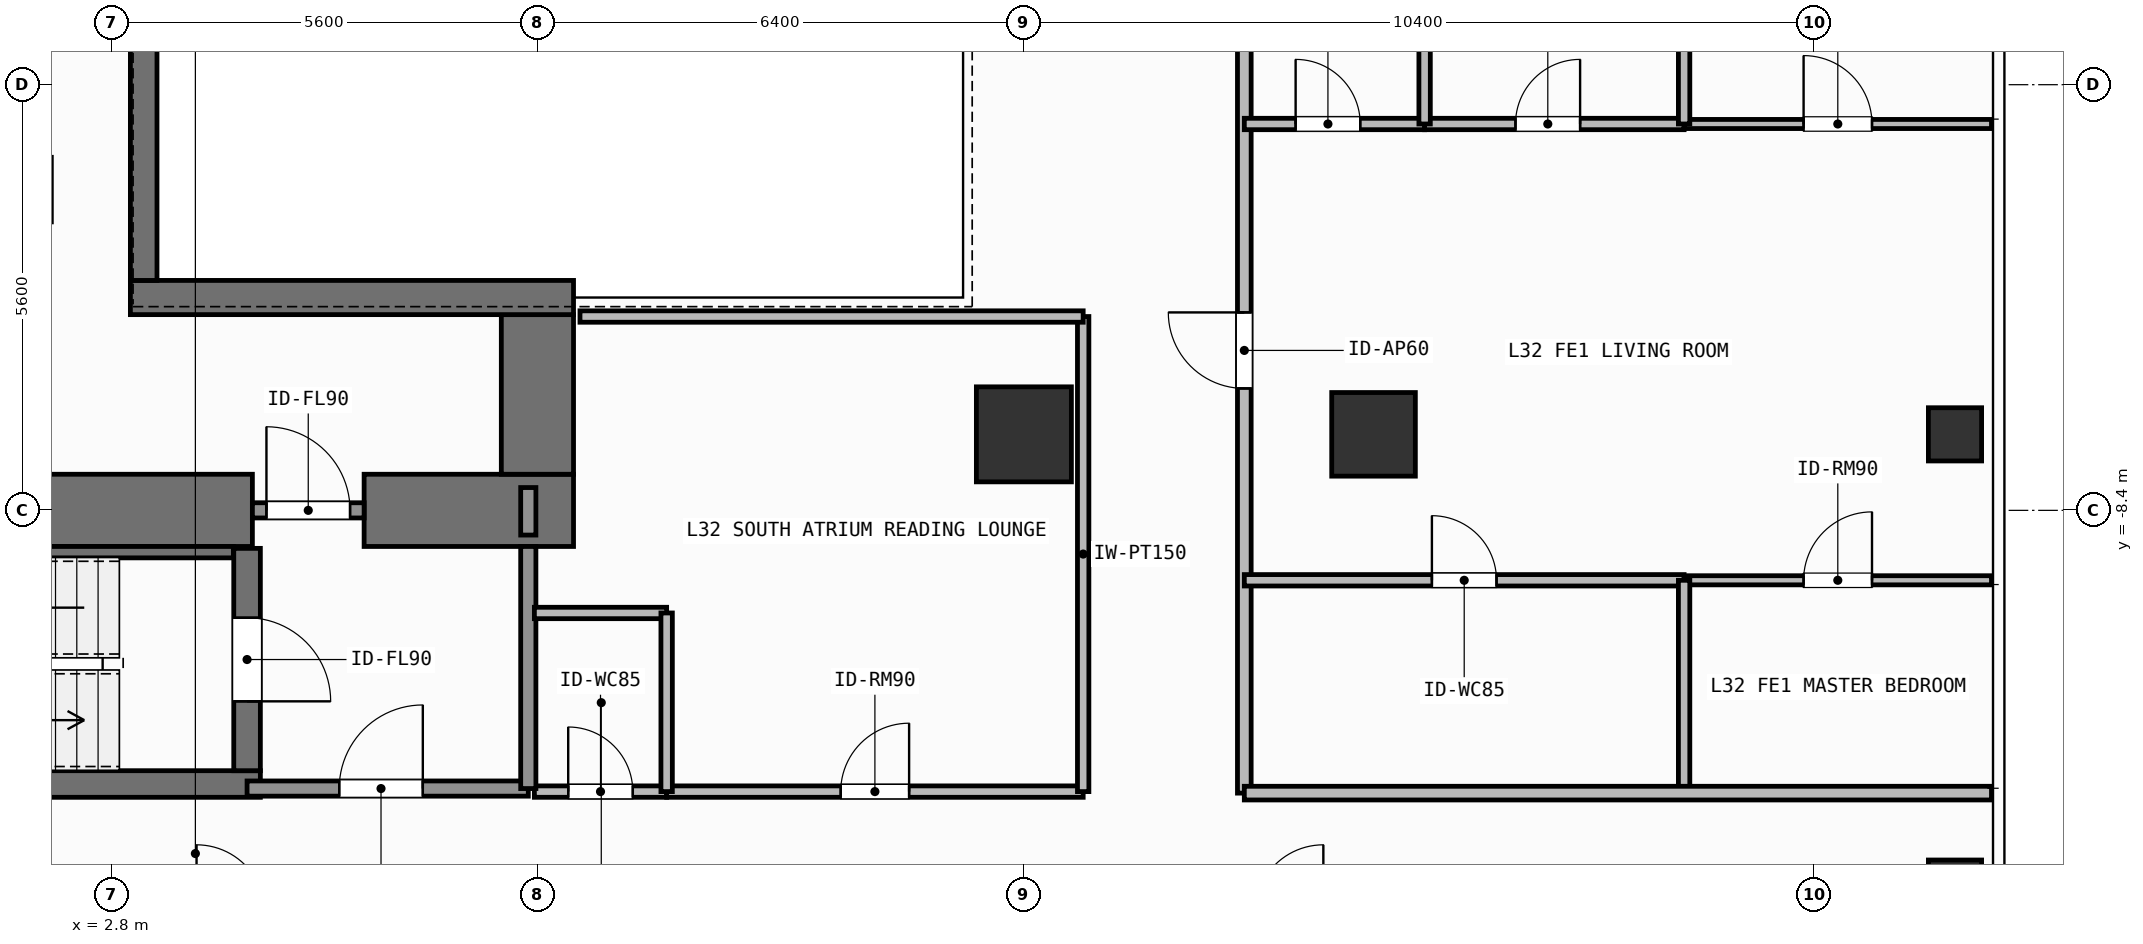
"""IFC4 building model, lengths in metres.
Left out: names, types, materials, properties, quantities, classifications, styles, units other than length and angle.
Written with IfcOpenShell. Run it as: python <this file> out.ifc"""

import sys

from ifc_helpers import new_model, si_unit, direction, frame, frame_2d, origin, origin_2d, place, context, subcontext, project, spatial, rectangle, hollow_rectangle, extrude, element, fill, save


model = new_model("IFC4")
c1 = context("Model", 3, precision=1e-05, world=origin(), true_north=direction((0.0, 1.0)))
c2 = subcontext(c1, "Body", "Model", "MODEL_VIEW")
j1 = project(units=[si_unit("LENGTHUNIT", "METRE"), si_unit("PLANEANGLEUNIT", "RADIAN")], contexts=[c1])
p1 = place(None, origin())
s1 = spatial("IfcSite", under=j1, at=p1, CompositionType="ELEMENT")
p2 = place(p1, origin())
s2 = spatial("IfcBuilding", under=s1, at=p2, CompositionType="ELEMENT")
p3 = place(p2, frame((0.0, 0.0, 129.0)))
s3 = spatial("IfcBuildingStorey", under=s2, at=p3, CompositionType="ELEMENT", Elevation=129.0)
p4 = place(p3, frame((-2.62, -8.4, 0.0), z_axis=(0.0, 0.0, 1.0), x_axis=(1.0, 0.0, 0.0)))
e1 = element("IfcWall", 1, at=p4, inside=s3, PredefinedType="SHEAR", context=c2, shape_type="SweptSolid", body=[
    extrude(rectangle(XDim=7.27, YDim=0.95, at=frame_2d((3.635, 0.0))), origin(), (0.0, 0.0, 1.0), 3.9),
])
p5 = place(p3, frame((6.12, -8.4, 0.0), z_axis=(0.0, 0.0, 1.0), x_axis=(1.0, 0.0, 0.0)))
e2 = element("IfcWall", 2, at=p5, inside=s3, PredefinedType="SHEAR", context=c2, shape_type="SweptSolid", body=[
    extrude(rectangle(XDim=2.755, YDim=0.95, at=frame_2d((1.377, 0.0))), origin(), (0.0, 0.0, 1.0), 3.9),
])
p6 = place(p3, frame((8.4, -7.925, 0.0), z_axis=(0.0, 0.0, 1.0), x_axis=(0.0, 1.0, 0.0)))
e3 = element("IfcWall", 3, at=p6, inside=s3, PredefinedType="SHEAR", context=c2, shape_type="SweptSolid", body=[
    extrude(rectangle(XDim=2.1, YDim=0.95, at=frame_2d((1.05, 0.0))), origin(), (0.0, 0.0, 1.0), 3.9),
])
p7 = place(p3, frame((3.045, -5.6, 0.0), z_axis=(0.0, 0.0, 1.0), x_axis=(1.0, 0.0, 0.0)))
e4 = element("IfcWall", 4, at=p7, inside=s3, PredefinedType="SHEAR", context=c2, shape_type="SweptSolid", body=[
    extrude(rectangle(XDim=5.83, YDim=0.45, at=frame_2d((2.915, 0.0))), origin(), (0.0, 0.0, 1.0), 3.9),
])
p8 = place(p3, frame((3.22, -5.375, 0.0), z_axis=(0.0, 0.0, 1.0), x_axis=(0.0, 1.0, 0.0)))
e5 = element("IfcWall", 5, at=p8, inside=s3, PredefinedType="SHEAR", context=c2, shape_type="SweptSolid", body=[
    extrude(rectangle(XDim=10.75, YDim=0.35, at=frame_2d((5.375, 0.0))), origin(), (0.0, 0.0, 1.0), 3.9),
])
p9 = place(p3, frame((-2.555, -12.0, 0.0), z_axis=(0.0, 0.0, 1.0), x_axis=(1.0, 0.0, 0.0)))
e6 = element("IfcWall", 6, at=p9, inside=s3, PredefinedType="SHEAR", context=c2, shape_type="SweptSolid", body=[
    extrude(rectangle(XDim=7.31, YDim=0.35, at=frame_2d((3.655, 0.0))), origin(), (0.0, 0.0, 1.0), 3.9),
])
p10 = place(p3, frame((-2.2, -8.95, 0.0), z_axis=(0.0, 0.0, 1.0), x_axis=(1.0, 0.0, 0.0)))
e7 = element("IfcWall", 7, at=p10, inside=s3, PredefinedType="SHEAR", context=c2, shape_type="SweptSolid", body=[
    extrude(rectangle(XDim=6.6, YDim=0.15, at=frame_2d((3.3, 0.0))), origin(), (0.0, 0.0, 1.0), 3.9),
])
p11 = place(p3, frame((4.58, -8.9, 0.0), z_axis=(0.0, 0.0, 1.0), x_axis=(0.0, -1.0, 0.0)))
e8 = element("IfcWall", 8, at=p11, inside=s3, PredefinedType="SHEAR", context=c2, shape_type="SweptSolid", body=[
    extrude(rectangle(XDim=2.925, YDim=0.35, at=frame_2d((1.462, 0.0))), origin(), (0.0, 0.0, 1.0), 3.9),
])
p12 = place(p11, frame((0.913, 0.0, 0.0)))
e9 = element("IfcOpeningElement", 9, at=p12, cuts=e8, PredefinedType="OPENING", context=c2, shape_type="SweptSolid", body=[
    extrude(rectangle(XDim=1.1, YDim=2.15, at=frame_2d((0.55, 1.075))), frame((0.0, 0.185, 0.0), z_axis=(0.0, -1.0, 0.0), x_axis=(1.0, 0.0, 0.0)), (0.0, 0.0, 1.0), 0.37),
])
p13 = place(p3, frame((14.8, -7.4, 0.0), z_axis=(0.0, 0.0, 1.0), x_axis=(1.0, 0.0, 0.0)))
e10 = element("IfcColumn", 10, at=p13, inside=s3, PredefinedType="COLUMN", context=c2, shape_type="SweptSolid", body=[
    extrude(rectangle(XDim=1.25, YDim=1.25, at=origin_2d()), origin(), (0.0, 0.0, 1.0), 3.9),
])
p14 = place(p3, frame((19.4, -7.4, 0.0), z_axis=(0.0, 0.0, 1.0), x_axis=(1.0, 0.0, 0.0)))
e11 = element("IfcColumn", 11, at=p14, inside=s3, PredefinedType="COLUMN", context=c2, shape_type="SweptSolid", body=[
    extrude(rectangle(XDim=1.1, YDim=1.1, at=origin_2d()), origin(), (0.0, 0.0, 1.0), 3.9),
])
for number, where, z_axis, x_axis in (
    (12, (27.05, -13.35, 0.0), (0.0, 0.0, 1.0), (1.0, 0.0, 0.0)),
    (13, (27.05, -7.4, 0.0), (0.0, 0.0, 1.0), (1.0, 0.0, 0.0)),
):
    element("IfcColumn", number, at=place(p3, frame(where, z_axis=z_axis, x_axis=x_axis)), inside=s3, PredefinedType="COLUMN", context=c2, shape_type="SweptSolid", body=[
        extrude(hollow_rectangle(XDim=0.7, YDim=0.7, WallThickness=0.032, at=origin_2d()), origin(), (0.0, 0.0, 1.0), 3.9),
    ])
p15 = place(p3, frame((4.58, -12.06, 0.0), z_axis=(0.0, 0.0, 1.0), x_axis=(1.0, 0.0, 0.0)))
e14 = element("IfcWall", 14, at=p15, inside=s3, PredefinedType="SOLIDWALL", context=c2, shape_type="SweptSolid", body=[
    extrude(rectangle(XDim=3.7, YDim=0.2, at=frame_2d((1.85, 0.0))), origin(), (0.0, 0.0, 1.0), 3.68),
])
p16 = place(p15, frame((1.212, 0.0, 0.0)))
e15 = element("IfcOpeningElement", 15, at=p16, cuts=e14, PredefinedType="OPENING", context=c2, shape_type="SweptSolid", body=[
    extrude(rectangle(XDim=1.1, YDim=2.15, at=frame_2d((0.55, 1.075))), frame((0.0, 0.11, 0.0), z_axis=(0.0, -1.0, 0.0), x_axis=(1.0, 0.0, 0.0)), (0.0, 0.0, 1.0), 0.22),
])
p17 = place(p3, frame((4.65, -8.4, 0.0), z_axis=(0.0, 0.0, 1.0), x_axis=(1.0, 0.0, 0.0)))
e16 = element("IfcWall", 16, at=p17, inside=s3, PredefinedType="SOLIDWALL", context=c2, shape_type="SweptSolid", body=[
    extrude(rectangle(XDim=1.47, YDim=0.2, at=frame_2d((0.735, 0.0))), origin(), (0.0, 0.0, 1.0), 2.72),
])
p18 = place(p17, frame((0.185, 0.0, 0.0)))
e17 = element("IfcOpeningElement", 17, at=p18, cuts=e16, PredefinedType="OPENING", context=c2, shape_type="SweptSolid", body=[
    extrude(rectangle(XDim=1.1, YDim=2.15, at=frame_2d((0.55, 1.075))), frame((0.0, 0.11, 0.0), z_axis=(0.0, -1.0, 0.0), x_axis=(1.0, 0.0, 0.0)), (0.0, 0.0, 1.0), 0.22),
])
p19 = place(p3, frame((8.36, -12.1, 0.0), z_axis=(0.0, 0.0, 1.0), x_axis=(1.0, 0.0, 0.0)))
e18 = element("IfcWall", 18, at=p19, inside=s3, PredefinedType="PARTITIONING", context=c2, shape_type="SweptSolid", body=[
    extrude(rectangle(XDim=1.74, YDim=0.15, at=frame_2d((0.87, 0.0))), origin(), (0.0, 0.0, 1.0), 3.68),
])
p20 = place(p19, frame((0.445, 0.0, 0.0)))
e19 = element("IfcOpeningElement", 19, at=p20, cuts=e18, PredefinedType="OPENING", context=c2, shape_type="SweptSolid", body=[
    extrude(rectangle(XDim=0.85, YDim=2.1, at=frame_2d((0.425, 1.05))), frame((0.0, 0.085, 0.0), z_axis=(0.0, -1.0, 0.0), x_axis=(1.0, 0.0, 0.0)), (0.0, 0.0, 1.0), 0.17),
])
p21 = place(p3, frame((10.1, -12.1, 0.0), z_axis=(0.0, 0.0, 1.0), x_axis=(1.0, 0.0, 0.0)))
e20 = element("IfcWall", 20, at=p21, inside=s3, PredefinedType="PARTITIONING", context=c2, shape_type="SweptSolid", body=[
    extrude(rectangle(XDim=5.48, YDim=0.15, at=frame_2d((2.74, 0.0))), origin(), (0.0, 0.0, 1.0), 3.68),
])
p22 = place(p21, frame((2.29, 0.0, 0.0)))
e21 = element("IfcOpeningElement", 21, at=p22, cuts=e20, PredefinedType="OPENING", context=c2, shape_type="SweptSolid", body=[
    extrude(rectangle(XDim=0.9, YDim=2.1, at=frame_2d((0.45, 1.05))), frame((0.0, 0.085, 0.0), z_axis=(0.0, -1.0, 0.0), x_axis=(1.0, 0.0, 0.0)), (0.0, 0.0, 1.0), 0.17),
])
p23 = place(p3, frame((17.7, -12.12, 0.0), z_axis=(0.0, 0.0, 1.0), x_axis=(0.0, 1.0, 0.0)))
e22 = element("IfcWall", 22, at=p23, inside=s3, PredefinedType="PARTITIONING", context=c2, shape_type="SweptSolid", body=[
    extrude(rectangle(XDim=13.429, YDim=0.18, at=frame_2d((6.715, 0.0))), origin(), (0.0, 0.0, 1.0), 3.68),
])
p24 = place(p23, frame((5.324, 0.0, 0.0)))
e23 = element("IfcOpeningElement", 23, at=p24, cuts=e22, PredefinedType="OPENING", context=c2, shape_type="SweptSolid", body=[
    extrude(rectangle(XDim=1.0, YDim=2.2, at=frame_2d((0.5, 1.1))), frame((0.0, 0.1, 0.0), z_axis=(0.0, -1.0, 0.0), x_axis=(1.0, 0.0, 0.0)), (0.0, 0.0, 1.0), 0.2),
])
p25 = place(p3, frame((17.7, -3.317, 0.0), z_axis=(0.0, 0.0, 1.0), x_axis=(1.0, 0.0, 0.0)))
e24 = element("IfcWall", 24, at=p25, inside=s3, PredefinedType="PARTITIONING", context=c2, shape_type="SweptSolid", body=[
    extrude(rectangle(XDim=2.372, YDim=0.15, at=frame_2d((1.186, 0.0))), origin(), (0.0, 0.0, 1.0), 3.68),
])
p26 = place(p25, frame((0.675, 0.0, 0.0)))
e25 = element("IfcOpeningElement", 25, at=p26, cuts=e24, PredefinedType="OPENING", context=c2, shape_type="SweptSolid", body=[
    extrude(rectangle(XDim=0.85, YDim=2.1, at=frame_2d((0.425, 1.05))), frame((0.0, 0.085, 0.0), z_axis=(0.0, -1.0, 0.0), x_axis=(1.0, 0.0, 0.0)), (0.0, 0.0, 1.0), 0.17),
])
p27 = place(p3, frame((20.072, -3.317, 0.0), z_axis=(0.0, 0.0, 1.0), x_axis=(1.0, 0.0, 0.0)))
e26 = element("IfcWall", 26, at=p27, inside=s3, PredefinedType="PARTITIONING", context=c2, shape_type="SweptSolid", body=[
    extrude(rectangle(XDim=3.414, YDim=0.15, at=frame_2d((1.707, 0.0))), origin(), (0.0, 0.0, 1.0), 3.68),
])
p28 = place(p27, frame((1.196, 0.0, 0.0)))
e27 = element("IfcOpeningElement", 27, at=p28, cuts=e26, PredefinedType="OPENING", context=c2, shape_type="SweptSolid", body=[
    extrude(rectangle(XDim=0.85, YDim=2.1, at=frame_2d((0.425, 1.05))), frame((0.0, 0.085, 0.0), z_axis=(0.0, -1.0, 0.0), x_axis=(1.0, 0.0, 0.0)), (0.0, 0.0, 1.0), 0.17),
])
p29 = place(p3, frame((17.7, -9.32, 0.0), z_axis=(0.0, 0.0, 1.0), x_axis=(1.0, 0.0, 0.0)))
e28 = element("IfcWall", 28, at=p29, inside=s3, PredefinedType="PARTITIONING", context=c2, shape_type="SweptSolid", body=[
    extrude(rectangle(XDim=5.786, YDim=0.15, at=frame_2d((2.893, 0.0))), origin(), (0.0, 0.0, 1.0), 3.68),
])
p30 = place(p29, frame((2.468, 0.0, 0.0)))
e29 = element("IfcOpeningElement", 29, at=p30, cuts=e28, PredefinedType="OPENING", context=c2, shape_type="SweptSolid", body=[
    extrude(rectangle(XDim=0.85, YDim=2.1, at=frame_2d((0.425, 1.05))), frame((0.0, 0.085, 0.0), z_axis=(0.0, -1.0, 0.0), x_axis=(1.0, 0.0, 0.0)), (0.0, 0.0, 1.0), 0.17),
])
p31 = place(p3, frame((23.486, -9.32, 0.0), z_axis=(0.0, 0.0, 1.0), x_axis=(1.0, 0.0, 0.0)))
e30 = element("IfcWall", 30, at=p31, inside=s3, PredefinedType="PARTITIONING", context=c2, shape_type="SweptSolid", body=[
    extrude(rectangle(XDim=4.044, YDim=0.12, at=frame_2d((2.022, 0.0))), origin(), (0.0, 0.0, 1.0), 3.68),
])
p32 = place(p31, frame((1.572, 0.0, 0.0)))
e31 = element("IfcOpeningElement", 31, at=p32, cuts=e30, PredefinedType="OPENING", context=c2, shape_type="SweptSolid", body=[
    extrude(rectangle(XDim=0.9, YDim=2.1, at=frame_2d((0.45, 1.05))), frame((0.0, 0.07, 0.0), z_axis=(0.0, -1.0, 0.0), x_axis=(1.0, 0.0, 0.0)), (0.0, 0.0, 1.0), 0.14),
])
p33 = place(p3, frame((23.486, -3.317, 0.0), z_axis=(0.0, 0.0, 1.0), x_axis=(1.0, 0.0, 0.0)))
e32 = element("IfcWall", 32, at=p33, inside=s3, PredefinedType="PARTITIONING", context=c2, shape_type="SweptSolid", body=[
    extrude(rectangle(XDim=4.044, YDim=0.12, at=frame_2d((2.022, 0.0))), origin(), (0.0, 0.0, 1.0), 3.68),
])
p34 = place(p33, frame((1.572, 0.0, 0.0)))
e33 = element("IfcOpeningElement", 33, at=p34, cuts=e32, PredefinedType="OPENING", context=c2, shape_type="SweptSolid", body=[
    extrude(rectangle(XDim=0.9, YDim=2.1, at=frame_2d((0.45, 1.05))), frame((0.0, 0.07, 0.0), z_axis=(0.0, -1.0, 0.0), x_axis=(1.0, 0.0, 0.0)), (0.0, 0.0, 1.0), 0.14),
])
p35 = place(p3, frame((8.28, -12.06, 0.0), z_axis=(0.0, 0.0, 1.0), x_axis=(0.0, 1.0, 0.0)))
e34 = element("IfcWall", 34, at=p35, inside=s3, PredefinedType="SOLIDWALL", context=c2, shape_type="SweptSolid", body=[
    extrude(rectangle(XDim=3.185, YDim=0.2, at=frame_2d((1.593, 0.0))), origin(), (0.0, 0.0, 1.0), 3.68),
])
p36 = place(p3, frame((8.28, -8.725, 0.0), z_axis=(0.0, 0.0, 1.0), x_axis=(0.0, 1.0, 0.0)))
e35 = element("IfcWall", 35, at=p36, inside=s3, PredefinedType="SOLIDWALL", context=c2, shape_type="SweptSolid", body=[
    extrude(rectangle(XDim=0.625, YDim=0.2, at=frame_2d((0.312, 0.0))), origin(), (0.0, 0.0, 1.0), 3.68),
])
p37 = place(p3, frame((8.36, -9.75, 0.0), z_axis=(0.0, 0.0, 1.0), x_axis=(1.0, 0.0, 0.0)))
e36 = element("IfcWall", 36, at=p37, inside=s3, PredefinedType="PARTITIONING", context=c2, shape_type="SweptSolid", body=[
    extrude(rectangle(XDim=1.74, YDim=0.15, at=frame_2d((0.87, 0.0))), origin(), (0.0, 0.0, 1.0), 3.68),
])
p38 = place(p3, frame((10.1, -12.1, 0.0), z_axis=(0.0, 0.0, 1.0), x_axis=(0.0, 1.0, 0.0)))
e37 = element("IfcWall", 37, at=p38, inside=s3, PredefinedType="PARTITIONING", context=c2, shape_type="SweptSolid", body=[
    extrude(rectangle(XDim=2.35, YDim=0.15, at=frame_2d((1.175, 0.0))), origin(), (0.0, 0.0, 1.0), 3.68),
])
p39 = place(p3, frame((15.58, -12.1, 0.0), z_axis=(0.0, 0.0, 1.0), x_axis=(0.0, 1.0, 0.0)))
e38 = element("IfcWall", 38, at=p39, inside=s3, PredefinedType="PARTITIONING", context=c2, shape_type="SweptSolid", body=[
    extrude(rectangle(XDim=6.25, YDim=0.15, at=frame_2d((3.125, 0.0))), origin(), (0.0, 0.0, 1.0), 3.68),
])
p40 = place(p3, frame((8.96, -5.85, 0.0), z_axis=(0.0, 0.0, 1.0), x_axis=(1.0, 0.0, 0.0)))
e39 = element("IfcWall", 39, at=p40, inside=s3, PredefinedType="PARTITIONING", context=c2, shape_type="SweptSolid", body=[
    extrude(rectangle(XDim=6.62, YDim=0.15, at=frame_2d((3.31, 0.0))), origin(), (0.0, 0.0, 1.0), 3.68),
])
p41 = place(p3, frame((20.072, -3.317, 0.0), z_axis=(0.0, 0.0, 1.0), x_axis=(0.0, 1.0, 0.0)))
e40 = element("IfcWall", 40, at=p41, inside=s3, PredefinedType="PARTITIONING", context=c2, shape_type="SweptSolid", body=[
    extrude(rectangle(XDim=4.626, YDim=0.15, at=frame_2d((2.313, 0.0))), origin(), (0.0, 0.0, 1.0), 3.68),
])
p42 = place(p3, frame((23.486, -12.12, 0.0), z_axis=(0.0, 0.0, 1.0), x_axis=(0.0, 1.0, 0.0)))
e41 = element("IfcWall", 41, at=p42, inside=s3, PredefinedType="PARTITIONING", context=c2, shape_type="SweptSolid", body=[
    extrude(rectangle(XDim=2.8, YDim=0.15, at=frame_2d((1.4, 0.0))), origin(), (0.0, 0.0, 1.0), 3.68),
])
p43 = place(p3, frame((23.486, -3.317, 0.0), z_axis=(0.0, 0.0, 1.0), x_axis=(0.0, 1.0, 0.0)))
e42 = element("IfcWall", 42, at=p43, inside=s3, PredefinedType="PARTITIONING", context=c2, shape_type="SweptSolid", body=[
    extrude(rectangle(XDim=4.626, YDim=0.15, at=frame_2d((2.313, 0.0))), origin(), (0.0, 0.0, 1.0), 3.68),
])
p44 = place(p3, frame((17.7, -12.12, 0.0), z_axis=(0.0, 0.0, 1.0), x_axis=(1.0, 0.0, 0.0)))
e43 = element("IfcWall", 43, at=p44, inside=s3, PredefinedType="PARTITIONING", context=c2, shape_type="SweptSolid", body=[
    extrude(rectangle(XDim=9.83, YDim=0.18, at=frame_2d((4.915, 0.0))), origin(), (0.0, 0.0, 1.0), 3.68),
])
p45 = place(p12, origin())
e44 = element("IfcDoor", 44, at=p45, inside=s3, OperationType="SINGLE_SWING_RIGHT", PredefinedType="DOOR", context=c2, shape_type="SweptSolid", body=[
    extrude(rectangle(XDim=1.1, YDim=2.15, at=frame_2d((0.55, 1.075))), frame((0.0, 0.025, 0.0), z_axis=(0.0, -1.0, 0.0), x_axis=(1.0, 0.0, 0.0)), (0.0, 0.0, 1.0), 0.05),
])
fill(e9, e44)
p46 = place(p16, origin())
e45 = element("IfcDoor", 45, at=p46, inside=s3, OperationType="SINGLE_SWING_RIGHT", PredefinedType="DOOR", context=c2, shape_type="SweptSolid", body=[
    extrude(rectangle(XDim=1.1, YDim=2.15, at=frame_2d((0.55, 1.075))), frame((0.0, 0.025, 0.0), z_axis=(0.0, -1.0, 0.0), x_axis=(1.0, 0.0, 0.0)), (0.0, 0.0, 1.0), 0.05),
])
fill(e15, e45)
p47 = place(p18, origin())
e46 = element("IfcDoor", 46, at=p47, inside=s3, OperationType="SINGLE_SWING_LEFT", PredefinedType="DOOR", context=c2, shape_type="SweptSolid", body=[
    extrude(rectangle(XDim=1.1, YDim=2.15, at=frame_2d((0.55, 1.075))), frame((0.0, 0.025, 0.0), z_axis=(0.0, -1.0, 0.0), x_axis=(1.0, 0.0, 0.0)), (0.0, 0.0, 1.0), 0.05),
])
fill(e17, e46)
p48 = place(p20, origin())
e47 = element("IfcDoor", 47, at=p48, inside=s3, OperationType="SINGLE_SWING_LEFT", PredefinedType="DOOR", context=c2, shape_type="SweptSolid", body=[
    extrude(rectangle(XDim=0.85, YDim=2.1, at=frame_2d((0.425, 1.05))), frame((0.0, 0.025, 0.0), z_axis=(0.0, -1.0, 0.0), x_axis=(1.0, 0.0, 0.0)), (0.0, 0.0, 1.0), 0.05),
])
fill(e19, e47)
p49 = place(p22, origin())
e48 = element("IfcDoor", 48, at=p49, inside=s3, OperationType="SINGLE_SWING_RIGHT", PredefinedType="DOOR", context=c2, shape_type="SweptSolid", body=[
    extrude(rectangle(XDim=0.9, YDim=2.1, at=frame_2d((0.45, 1.05))), frame((0.0, 0.025, 0.0), z_axis=(0.0, -1.0, 0.0), x_axis=(1.0, 0.0, 0.0)), (0.0, 0.0, 1.0), 0.05),
])
fill(e21, e48)
p50 = place(p24, origin())
e49 = element("IfcDoor", 49, at=p50, inside=s3, OperationType="SINGLE_SWING_RIGHT", PredefinedType="DOOR", context=c2, shape_type="SweptSolid", body=[
    extrude(rectangle(XDim=1.0, YDim=2.2, at=frame_2d((0.5, 1.1))), frame((0.0, 0.025, 0.0), z_axis=(0.0, -1.0, 0.0), x_axis=(1.0, 0.0, 0.0)), (0.0, 0.0, 1.0), 0.05),
])
fill(e23, e49)
p51 = place(p26, origin())
e50 = element("IfcDoor", 50, at=p51, inside=s3, OperationType="SINGLE_SWING_LEFT", PredefinedType="DOOR", context=c2, shape_type="SweptSolid", body=[
    extrude(rectangle(XDim=0.85, YDim=2.1, at=frame_2d((0.425, 1.05))), frame((0.0, 0.025, 0.0), z_axis=(0.0, -1.0, 0.0), x_axis=(1.0, 0.0, 0.0)), (0.0, 0.0, 1.0), 0.05),
])
fill(e25, e50)
p52 = place(p28, origin())
e51 = element("IfcDoor", 51, at=p52, inside=s3, OperationType="SINGLE_SWING_RIGHT", PredefinedType="DOOR", context=c2, shape_type="SweptSolid", body=[
    extrude(rectangle(XDim=0.85, YDim=2.1, at=frame_2d((0.425, 1.05))), frame((0.0, 0.025, 0.0), z_axis=(0.0, -1.0, 0.0), x_axis=(1.0, 0.0, 0.0)), (0.0, 0.0, 1.0), 0.05),
])
fill(e27, e51)
p53 = place(p30, origin())
e52 = element("IfcDoor", 52, at=p53, inside=s3, OperationType="SINGLE_SWING_LEFT", PredefinedType="DOOR", context=c2, shape_type="SweptSolid", body=[
    extrude(rectangle(XDim=0.85, YDim=2.1, at=frame_2d((0.425, 1.05))), frame((0.0, 0.025, 0.0), z_axis=(0.0, -1.0, 0.0), x_axis=(1.0, 0.0, 0.0)), (0.0, 0.0, 1.0), 0.05),
])
fill(e29, e52)
p54 = place(p32, origin())
e53 = element("IfcDoor", 53, at=p54, inside=s3, OperationType="SINGLE_SWING_RIGHT", PredefinedType="DOOR", context=c2, shape_type="SweptSolid", body=[
    extrude(rectangle(XDim=0.9, YDim=2.1, at=frame_2d((0.45, 1.05))), frame((0.0, 0.025, 0.0), z_axis=(0.0, -1.0, 0.0), x_axis=(1.0, 0.0, 0.0)), (0.0, 0.0, 1.0), 0.05),
])
fill(e31, e53)
p55 = place(p34, origin())
e54 = element("IfcDoor", 54, at=p55, inside=s3, OperationType="SINGLE_SWING_LEFT", PredefinedType="DOOR", context=c2, shape_type="SweptSolid", body=[
    extrude(rectangle(XDim=0.9, YDim=2.1, at=frame_2d((0.45, 1.05))), frame((0.0, 0.025, 0.0), z_axis=(0.0, -1.0, 0.0), x_axis=(1.0, 0.0, 0.0)), (0.0, 0.0, 1.0), 0.05),
])
fill(e33, e54)
save(model, sys.argv[1])
